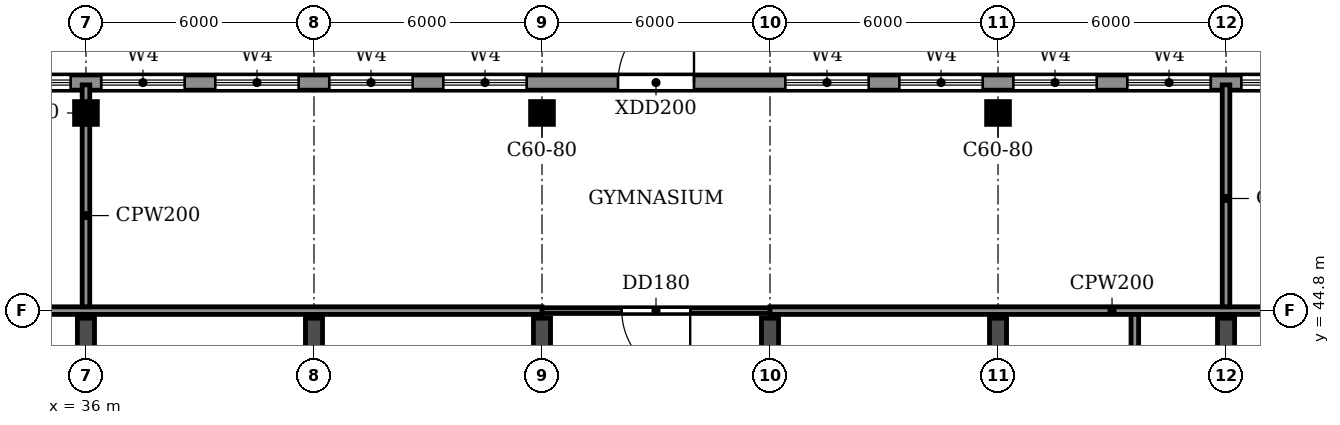
"""IFC4 building model, lengths in metres.
Left out: names, types, materials, properties, quantities, classifications, styles, units other than length and angle.
Written with IfcOpenShell. Run it as: python <this file> out.ifc"""

import sys

from ifc_helpers import new_model, si_unit, direction, frame, frame_2d, origin, origin_2d, place, context, subcontext, project, spatial, rectangle, extrude, source, transform, mapped, element, fill, save


model = new_model("IFC4")
c1 = context("Model", 3, precision=1e-05, world=origin(), true_north=direction((0.0, 1.0)))
c2 = subcontext(c1, "Body", "Model", "MODEL_VIEW")
j1 = project(units=[si_unit("LENGTHUNIT", "METRE"), si_unit("PLANEANGLEUNIT", "RADIAN")], contexts=[c1])
p1 = place(None, origin())
s1 = spatial("IfcSite", under=j1, at=p1, CompositionType="ELEMENT")
p2 = place(p1, origin())
s2 = spatial("IfcBuilding", under=s1, at=p2, CompositionType="ELEMENT")
p3 = place(p2, frame((0.0, 0.0, 19.2)))
s3 = spatial("IfcBuildingStorey", under=s2, at=p3, CompositionType="ELEMENT", Elevation=19.2)
for number, where, z_axis, x_axis in (
    (1, (36.0, 30.55, 0.0), (0.0, 0.0, 1.0), (0.0, 1.0, 0.0)),
    (2, (42.0, 30.55, 0.0), (0.0, 0.0, 1.0), (0.0, 1.0, 0.0)),
    (3, (48.0, 30.55, 0.0), (0.0, 0.0, 1.0), (0.0, 1.0, 0.0)),
    (4, (54.0, 30.55, 0.0), (0.0, 0.0, 1.0), (0.0, 1.0, 0.0)),
    (5, (60.0, 30.55, 0.0), (0.0, 0.0, 1.0), (0.0, 1.0, 0.0)),
    (6, (66.0, 30.55, 0.0), (0.0, 0.0, 1.0), (0.0, 1.0, 0.0)),
):
    element("IfcWall", number, at=place(p3, frame(where, z_axis=z_axis, x_axis=x_axis)), inside=s3, PredefinedType="SHEAR", context=c2, shape_type="SweptSolid", body=[
        extrude(rectangle(XDim=14.05, YDim=0.45, at=frame_2d((7.025, 0.0))), origin(), (0.0, 0.0, 1.0), 3.95),
    ])
m1 = source(origin(), c2, "Body", "SweptSolid", [
    extrude(rectangle(XDim=0.6, YDim=0.6, at=origin_2d()), origin(), (0.0, 0.0, 1.0), 3.95),
])
for number, where, z_axis, x_axis in (
    (7, (36.0, 50.0, 0.0), (0.0, 0.0, 1.0), (1.0, 0.0, 0.0)),
    (8, (48.0, 50.0, 0.0), (0.0, 0.0, 1.0), (1.0, 0.0, 0.0)),
    (9, (60.0, 50.0, 0.0), (0.0, 0.0, 1.0), (1.0, 0.0, 0.0)),
):
    element("IfcColumn", number, at=place(p3, frame(where, z_axis=z_axis, x_axis=x_axis)), inside=s3, PredefinedType="COLUMN", context=c2, shape_type="MappedRepresentation", body=[
        mapped(m1, transform((0.0, 0.0, 0.0))),
    ])
p4 = place(p3, frame((105.0, 50.8, 0.0), z_axis=(0.0, 0.0, 1.0), x_axis=(-1.0, 0.0, 0.0)))
e10 = element("IfcWall", 10, at=p4, inside=s3, PredefinedType="STANDARD", context=c2, shape_type="SweptSolid", body=[
    extrude(rectangle(XDim=108.0, YDim=0.4, at=frame_2d((54.0, 0.0))), origin(), (0.0, 0.0, 1.0), 3.95),
])
p5 = place(p4, frame((102.4, 0.0, 0.9)))
e11 = element("IfcOpeningElement", 11, at=p5, cuts=e10, PredefinedType="OPENING", context=c2, shape_type="SweptSolid", body=[
    extrude(rectangle(XDim=2.2, YDim=2.7, at=frame_2d((1.1, 1.35))), frame((0.0, 0.21, 0.0), z_axis=(0.0, -1.0, 0.0), x_axis=(1.0, 0.0, 0.0)), (0.0, 0.0, 1.0), 0.42),
])
p6 = place(p4, frame((99.4, 0.0, 0.9)))
e12 = element("IfcOpeningElement", 12, at=p6, cuts=e10, PredefinedType="OPENING", context=c2, shape_type="SweptSolid", body=[
    extrude(rectangle(XDim=2.2, YDim=2.7, at=frame_2d((1.1, 1.35))), frame((0.0, 0.21, 0.0), z_axis=(0.0, -1.0, 0.0), x_axis=(1.0, 0.0, 0.0)), (0.0, 0.0, 1.0), 0.42),
])
p7 = place(p4, frame((96.4, 0.0, 0.9)))
e13 = element("IfcOpeningElement", 13, at=p7, cuts=e10, PredefinedType="OPENING", context=c2, shape_type="SweptSolid", body=[
    extrude(rectangle(XDim=2.2, YDim=2.7, at=frame_2d((1.1, 1.35))), frame((0.0, 0.21, 0.0), z_axis=(0.0, -1.0, 0.0), x_axis=(1.0, 0.0, 0.0)), (0.0, 0.0, 1.0), 0.42),
])
p8 = place(p4, frame((93.4, 0.0, 0.9)))
e14 = element("IfcOpeningElement", 14, at=p8, cuts=e10, PredefinedType="OPENING", context=c2, shape_type="SweptSolid", body=[
    extrude(rectangle(XDim=2.2, YDim=2.7, at=frame_2d((1.1, 1.35))), frame((0.0, 0.21, 0.0), z_axis=(0.0, -1.0, 0.0), x_axis=(1.0, 0.0, 0.0)), (0.0, 0.0, 1.0), 0.42),
])
p9 = place(p4, frame((90.4, 0.0, 0.9)))
e15 = element("IfcOpeningElement", 15, at=p9, cuts=e10, PredefinedType="OPENING", context=c2, shape_type="SweptSolid", body=[
    extrude(rectangle(XDim=2.2, YDim=2.7, at=frame_2d((1.1, 1.35))), frame((0.0, 0.21, 0.0), z_axis=(0.0, -1.0, 0.0), x_axis=(1.0, 0.0, 0.0)), (0.0, 0.0, 1.0), 0.42),
])
p10 = place(p4, frame((81.4, 0.0, 0.9)))
e16 = element("IfcOpeningElement", 16, at=p10, cuts=e10, PredefinedType="OPENING", context=c2, shape_type="SweptSolid", body=[
    extrude(rectangle(XDim=2.2, YDim=2.7, at=frame_2d((1.1, 1.35))), frame((0.0, 0.21, 0.0), z_axis=(0.0, -1.0, 0.0), x_axis=(1.0, 0.0, 0.0)), (0.0, 0.0, 1.0), 0.42),
])
p11 = place(p4, frame((78.4, 0.0, 0.9)))
e17 = element("IfcOpeningElement", 17, at=p11, cuts=e10, PredefinedType="OPENING", context=c2, shape_type="SweptSolid", body=[
    extrude(rectangle(XDim=2.2, YDim=2.7, at=frame_2d((1.1, 1.35))), frame((0.0, 0.21, 0.0), z_axis=(0.0, -1.0, 0.0), x_axis=(1.0, 0.0, 0.0)), (0.0, 0.0, 1.0), 0.42),
])
p12 = place(p4, frame((75.4, 0.0, 0.9)))
e18 = element("IfcOpeningElement", 18, at=p12, cuts=e10, PredefinedType="OPENING", context=c2, shape_type="SweptSolid", body=[
    extrude(rectangle(XDim=2.2, YDim=2.7, at=frame_2d((1.1, 1.35))), frame((0.0, 0.21, 0.0), z_axis=(0.0, -1.0, 0.0), x_axis=(1.0, 0.0, 0.0)), (0.0, 0.0, 1.0), 0.42),
])
p13 = place(p4, frame((72.4, 0.0, 0.9)))
e19 = element("IfcOpeningElement", 19, at=p13, cuts=e10, PredefinedType="OPENING", context=c2, shape_type="SweptSolid", body=[
    extrude(rectangle(XDim=2.2, YDim=2.7, at=frame_2d((1.1, 1.35))), frame((0.0, 0.21, 0.0), z_axis=(0.0, -1.0, 0.0), x_axis=(1.0, 0.0, 0.0)), (0.0, 0.0, 1.0), 0.42),
])
p14 = place(p4, frame((69.4, 0.0, 0.9)))
e20 = element("IfcOpeningElement", 20, at=p14, cuts=e10, PredefinedType="OPENING", context=c2, shape_type="SweptSolid", body=[
    extrude(rectangle(XDim=2.2, YDim=2.7, at=frame_2d((1.1, 1.35))), frame((0.0, 0.21, 0.0), z_axis=(0.0, -1.0, 0.0), x_axis=(1.0, 0.0, 0.0)), (0.0, 0.0, 1.0), 0.42),
])
p15 = place(p4, frame((66.4, 0.0, 0.9)))
e21 = element("IfcOpeningElement", 21, at=p15, cuts=e10, PredefinedType="OPENING", context=c2, shape_type="SweptSolid", body=[
    extrude(rectangle(XDim=2.2, YDim=2.7, at=frame_2d((1.1, 1.35))), frame((0.0, 0.21, 0.0), z_axis=(0.0, -1.0, 0.0), x_axis=(1.0, 0.0, 0.0)), (0.0, 0.0, 1.0), 0.42),
])
p16 = place(p4, frame((63.4, 0.0, 0.9)))
e22 = element("IfcOpeningElement", 22, at=p16, cuts=e10, PredefinedType="OPENING", context=c2, shape_type="SweptSolid", body=[
    extrude(rectangle(XDim=2.2, YDim=2.7, at=frame_2d((1.1, 1.35))), frame((0.0, 0.21, 0.0), z_axis=(0.0, -1.0, 0.0), x_axis=(1.0, 0.0, 0.0)), (0.0, 0.0, 1.0), 0.42),
])
p17 = place(p4, frame((60.4, 0.0, 0.9)))
e23 = element("IfcOpeningElement", 23, at=p17, cuts=e10, PredefinedType="OPENING", context=c2, shape_type="SweptSolid", body=[
    extrude(rectangle(XDim=2.2, YDim=2.7, at=frame_2d((1.1, 1.35))), frame((0.0, 0.21, 0.0), z_axis=(0.0, -1.0, 0.0), x_axis=(1.0, 0.0, 0.0)), (0.0, 0.0, 1.0), 0.42),
])
p18 = place(p4, frame((57.4, 0.0, 0.9)))
e24 = element("IfcOpeningElement", 24, at=p18, cuts=e10, PredefinedType="OPENING", context=c2, shape_type="SweptSolid", body=[
    extrude(rectangle(XDim=2.2, YDim=2.7, at=frame_2d((1.1, 1.35))), frame((0.0, 0.21, 0.0), z_axis=(0.0, -1.0, 0.0), x_axis=(1.0, 0.0, 0.0)), (0.0, 0.0, 1.0), 0.42),
])
p19 = place(p4, frame((48.4, 0.0, 0.9)))
e25 = element("IfcOpeningElement", 25, at=p19, cuts=e10, PredefinedType="OPENING", context=c2, shape_type="SweptSolid", body=[
    extrude(rectangle(XDim=2.2, YDim=2.7, at=frame_2d((1.1, 1.35))), frame((0.0, 0.21, 0.0), z_axis=(0.0, -1.0, 0.0), x_axis=(1.0, 0.0, 0.0)), (0.0, 0.0, 1.0), 0.42),
])
p20 = place(p4, frame((45.4, 0.0, 0.9)))
e26 = element("IfcOpeningElement", 26, at=p20, cuts=e10, PredefinedType="OPENING", context=c2, shape_type="SweptSolid", body=[
    extrude(rectangle(XDim=2.2, YDim=2.7, at=frame_2d((1.1, 1.35))), frame((0.0, 0.21, 0.0), z_axis=(0.0, -1.0, 0.0), x_axis=(1.0, 0.0, 0.0)), (0.0, 0.0, 1.0), 0.42),
])
p21 = place(p4, frame((42.4, 0.0, 0.9)))
e27 = element("IfcOpeningElement", 27, at=p21, cuts=e10, PredefinedType="OPENING", context=c2, shape_type="SweptSolid", body=[
    extrude(rectangle(XDim=2.2, YDim=2.7, at=frame_2d((1.1, 1.35))), frame((0.0, 0.21, 0.0), z_axis=(0.0, -1.0, 0.0), x_axis=(1.0, 0.0, 0.0)), (0.0, 0.0, 1.0), 0.42),
])
p22 = place(p4, frame((39.4, 0.0, 0.9)))
e28 = element("IfcOpeningElement", 28, at=p22, cuts=e10, PredefinedType="OPENING", context=c2, shape_type="SweptSolid", body=[
    extrude(rectangle(XDim=2.2, YDim=2.7, at=frame_2d((1.1, 1.35))), frame((0.0, 0.21, 0.0), z_axis=(0.0, -1.0, 0.0), x_axis=(1.0, 0.0, 0.0)), (0.0, 0.0, 1.0), 0.42),
])
p23 = place(p4, frame((36.4, 0.0, 0.9)))
e29 = element("IfcOpeningElement", 29, at=p23, cuts=e10, PredefinedType="OPENING", context=c2, shape_type="SweptSolid", body=[
    extrude(rectangle(XDim=2.2, YDim=2.7, at=frame_2d((1.1, 1.35))), frame((0.0, 0.21, 0.0), z_axis=(0.0, -1.0, 0.0), x_axis=(1.0, 0.0, 0.0)), (0.0, 0.0, 1.0), 0.42),
])
p24 = place(p4, frame((33.4, 0.0, 0.9)))
e30 = element("IfcOpeningElement", 30, at=p24, cuts=e10, PredefinedType="OPENING", context=c2, shape_type="SweptSolid", body=[
    extrude(rectangle(XDim=2.2, YDim=2.7, at=frame_2d((1.1, 1.35))), frame((0.0, 0.21, 0.0), z_axis=(0.0, -1.0, 0.0), x_axis=(1.0, 0.0, 0.0)), (0.0, 0.0, 1.0), 0.42),
])
p25 = place(p4, frame((24.4, 0.0, 0.9)))
e31 = element("IfcOpeningElement", 31, at=p25, cuts=e10, PredefinedType="OPENING", context=c2, shape_type="SweptSolid", body=[
    extrude(rectangle(XDim=2.2, YDim=2.7, at=frame_2d((1.1, 1.35))), frame((0.0, 0.21, 0.0), z_axis=(0.0, -1.0, 0.0), x_axis=(1.0, 0.0, 0.0)), (0.0, 0.0, 1.0), 0.42),
])
p26 = place(p4, frame((21.4, 0.0, 0.9)))
e32 = element("IfcOpeningElement", 32, at=p26, cuts=e10, PredefinedType="OPENING", context=c2, shape_type="SweptSolid", body=[
    extrude(rectangle(XDim=2.2, YDim=2.7, at=frame_2d((1.1, 1.35))), frame((0.0, 0.21, 0.0), z_axis=(0.0, -1.0, 0.0), x_axis=(1.0, 0.0, 0.0)), (0.0, 0.0, 1.0), 0.42),
])
p27 = place(p4, frame((18.4, 0.0, 0.9)))
e33 = element("IfcOpeningElement", 33, at=p27, cuts=e10, PredefinedType="OPENING", context=c2, shape_type="SweptSolid", body=[
    extrude(rectangle(XDim=2.2, YDim=2.7, at=frame_2d((1.1, 1.35))), frame((0.0, 0.21, 0.0), z_axis=(0.0, -1.0, 0.0), x_axis=(1.0, 0.0, 0.0)), (0.0, 0.0, 1.0), 0.42),
])
p28 = place(p4, frame((15.4, 0.0, 0.9)))
e34 = element("IfcOpeningElement", 34, at=p28, cuts=e10, PredefinedType="OPENING", context=c2, shape_type="SweptSolid", body=[
    extrude(rectangle(XDim=2.2, YDim=2.7, at=frame_2d((1.1, 1.35))), frame((0.0, 0.21, 0.0), z_axis=(0.0, -1.0, 0.0), x_axis=(1.0, 0.0, 0.0)), (0.0, 0.0, 1.0), 0.42),
])
p29 = place(p4, frame((12.4, 0.0, 0.9)))
e35 = element("IfcOpeningElement", 35, at=p29, cuts=e10, PredefinedType="OPENING", context=c2, shape_type="SweptSolid", body=[
    extrude(rectangle(XDim=2.2, YDim=2.7, at=frame_2d((1.1, 1.35))), frame((0.0, 0.21, 0.0), z_axis=(0.0, -1.0, 0.0), x_axis=(1.0, 0.0, 0.0)), (0.0, 0.0, 1.0), 0.42),
])
p30 = place(p4, frame((9.4, 0.0, 0.9)))
e36 = element("IfcOpeningElement", 36, at=p30, cuts=e10, PredefinedType="OPENING", context=c2, shape_type="SweptSolid", body=[
    extrude(rectangle(XDim=2.2, YDim=2.7, at=frame_2d((1.1, 1.35))), frame((0.0, 0.21, 0.0), z_axis=(0.0, -1.0, 0.0), x_axis=(1.0, 0.0, 0.0)), (0.0, 0.0, 1.0), 0.42),
])
p31 = place(p4, frame((6.4, 0.0, 0.9)))
e37 = element("IfcOpeningElement", 37, at=p31, cuts=e10, PredefinedType="OPENING", context=c2, shape_type="SweptSolid", body=[
    extrude(rectangle(XDim=2.2, YDim=2.7, at=frame_2d((1.1, 1.35))), frame((0.0, 0.21, 0.0), z_axis=(0.0, -1.0, 0.0), x_axis=(1.0, 0.0, 0.0)), (0.0, 0.0, 1.0), 0.42),
])
p32 = place(p4, frame((3.4, 0.0, 0.9)))
e38 = element("IfcOpeningElement", 38, at=p32, cuts=e10, PredefinedType="OPENING", context=c2, shape_type="SweptSolid", body=[
    extrude(rectangle(XDim=2.2, YDim=2.7, at=frame_2d((1.1, 1.35))), frame((0.0, 0.21, 0.0), z_axis=(0.0, -1.0, 0.0), x_axis=(1.0, 0.0, 0.0)), (0.0, 0.0, 1.0), 0.42),
])
p33 = place(p4, frame((86.0, 0.0, 0.0)))
e39 = element("IfcOpeningElement", 39, at=p33, cuts=e10, PredefinedType="OPENING", context=c2, shape_type="SweptSolid", body=[
    extrude(rectangle(XDim=2.0, YDim=2.4, at=frame_2d((1.0, 1.2))), frame((0.0, 0.21, 0.0), z_axis=(0.0, -1.0, 0.0), x_axis=(1.0, 0.0, 0.0)), (0.0, 0.0, 1.0), 0.42),
])
p34 = place(p4, frame((53.0, 0.0, 0.0)))
e40 = element("IfcOpeningElement", 40, at=p34, cuts=e10, PredefinedType="OPENING", context=c2, shape_type="SweptSolid", body=[
    extrude(rectangle(XDim=2.0, YDim=2.4, at=frame_2d((1.0, 1.2))), frame((0.0, 0.21, 0.0), z_axis=(0.0, -1.0, 0.0), x_axis=(1.0, 0.0, 0.0)), (0.0, 0.0, 1.0), 0.42),
])
p35 = place(p4, frame((29.0, 0.0, 0.0)))
e41 = element("IfcOpeningElement", 41, at=p35, cuts=e10, PredefinedType="OPENING", context=c2, shape_type="SweptSolid", body=[
    extrude(rectangle(XDim=2.0, YDim=2.4, at=frame_2d((1.0, 1.2))), frame((0.0, 0.21, 0.0), z_axis=(0.0, -1.0, 0.0), x_axis=(1.0, 0.0, 0.0)), (0.0, 0.0, 1.0), 0.42),
])
p36 = place(p3, frame((48.0, 44.8, 0.0), z_axis=(0.0, 0.0, 1.0), x_axis=(1.0, 0.0, 0.0)))
e42 = element("IfcWall", 42, at=p36, inside=s3, PredefinedType="PARTITIONING", context=c2, shape_type="SweptSolid", body=[
    extrude(rectangle(XDim=6.0, YDim=0.15, at=frame_2d((3.0, 0.0))), origin(), (0.0, 0.0, 1.0), 3.95),
])
p37 = place(p36, frame((2.1, 0.0, 0.0)))
e43 = element("IfcOpeningElement", 43, at=p37, cuts=e42, PredefinedType="OPENING", context=c2, shape_type="SweptSolid", body=[
    extrude(rectangle(XDim=1.8, YDim=2.1, at=frame_2d((0.9, 1.05))), frame((0.0, 0.085, 0.0), z_axis=(0.0, -1.0, 0.0), x_axis=(1.0, 0.0, 0.0)), (0.0, 0.0, 1.0), 0.17),
])
p38 = place(p3, frame((18.0, 44.8, 0.0), z_axis=(0.0, 0.0, 1.0), x_axis=(1.0, 0.0, 0.0)))
e44 = element("IfcWall", 44, at=p38, inside=s3, PredefinedType="PARTITIONING", context=c2, shape_type="SweptSolid", body=[
    extrude(rectangle(XDim=30.0, YDim=0.2, at=frame_2d((15.0, 0.0))), origin(), (0.0, 0.0, 1.0), 3.95),
])
p39 = place(p3, frame((54.0, 44.8, 0.0), z_axis=(0.0, 0.0, 1.0), x_axis=(1.0, 0.0, 0.0)))
e45 = element("IfcWall", 45, at=p39, inside=s3, PredefinedType="PARTITIONING", context=c2, shape_type="SweptSolid", body=[
    extrude(rectangle(XDim=18.0, YDim=0.2, at=frame_2d((9.0, 0.0))), origin(), (0.0, 0.0, 1.0), 3.95),
])
p40 = place(p3, frame((36.0, 44.9, 0.0), z_axis=(0.0, 0.0, 1.0), x_axis=(0.0, 1.0, 0.0)))
e46 = element("IfcWall", 46, at=p40, inside=s3, PredefinedType="PARTITIONING", context=c2, shape_type="SweptSolid", body=[
    extrude(rectangle(XDim=5.84, YDim=0.2, at=frame_2d((2.92, 0.0))), origin(), (0.0, 0.0, 1.0), 3.95),
])
p41 = place(p3, frame((63.6, 32.875, 0.0), z_axis=(0.0, 0.0, 1.0), x_axis=(0.0, 1.0, 0.0)))
e47 = element("IfcWall", 47, at=p41, inside=s3, PredefinedType="PARTITIONING", context=c2, shape_type="SweptSolid", body=[
    extrude(rectangle(XDim=11.825, YDim=0.2, at=frame_2d((5.913, 0.0))), origin(), (0.0, 0.0, 1.0), 3.95),
])
p42 = place(p3, frame((66.0, 44.9, 0.0), z_axis=(0.0, 0.0, 1.0), x_axis=(0.0, 1.0, 0.0)))
e48 = element("IfcWall", 48, at=p42, inside=s3, PredefinedType="PARTITIONING", context=c2, shape_type="SweptSolid", body=[
    extrude(rectangle(XDim=5.84, YDim=0.2, at=frame_2d((2.92, 0.0))), origin(), (0.0, 0.0, 1.0), 3.95),
])
p43 = place(p14, origin())
e49 = element("IfcWindow", 49, at=p43, inside=s3, PartitioningType="DOUBLE_PANEL_HORIZONTAL", PredefinedType="WINDOW", context=c2, shape_type="SweptSolid", body=[
    extrude(rectangle(XDim=2.2, YDim=2.7, at=frame_2d((1.1, 1.35))), frame((0.0, 0.03, 0.0), z_axis=(0.0, -1.0, 0.0), x_axis=(1.0, 0.0, 0.0)), (0.0, 0.0, 1.0), 0.06),
])
fill(e20, e49)
p44 = place(p15, origin())
e50 = element("IfcWindow", 50, at=p44, inside=s3, PartitioningType="DOUBLE_PANEL_HORIZONTAL", PredefinedType="WINDOW", context=c2, shape_type="SweptSolid", body=[
    extrude(rectangle(XDim=2.2, YDim=2.7, at=frame_2d((1.1, 1.35))), frame((0.0, 0.03, 0.0), z_axis=(0.0, -1.0, 0.0), x_axis=(1.0, 0.0, 0.0)), (0.0, 0.0, 1.0), 0.06),
])
fill(e21, e50)
p45 = place(p16, origin())
e51 = element("IfcWindow", 51, at=p45, inside=s3, PartitioningType="DOUBLE_PANEL_HORIZONTAL", PredefinedType="WINDOW", context=c2, shape_type="SweptSolid", body=[
    extrude(rectangle(XDim=2.2, YDim=2.7, at=frame_2d((1.1, 1.35))), frame((0.0, 0.03, 0.0), z_axis=(0.0, -1.0, 0.0), x_axis=(1.0, 0.0, 0.0)), (0.0, 0.0, 1.0), 0.06),
])
fill(e22, e51)
p46 = place(p17, origin())
e52 = element("IfcWindow", 52, at=p46, inside=s3, PartitioningType="DOUBLE_PANEL_HORIZONTAL", PredefinedType="WINDOW", context=c2, shape_type="SweptSolid", body=[
    extrude(rectangle(XDim=2.2, YDim=2.7, at=frame_2d((1.1, 1.35))), frame((0.0, 0.03, 0.0), z_axis=(0.0, -1.0, 0.0), x_axis=(1.0, 0.0, 0.0)), (0.0, 0.0, 1.0), 0.06),
])
fill(e23, e52)
p47 = place(p18, origin())
e53 = element("IfcWindow", 53, at=p47, inside=s3, PartitioningType="DOUBLE_PANEL_HORIZONTAL", PredefinedType="WINDOW", context=c2, shape_type="SweptSolid", body=[
    extrude(rectangle(XDim=2.2, YDim=2.7, at=frame_2d((1.1, 1.35))), frame((0.0, 0.03, 0.0), z_axis=(0.0, -1.0, 0.0), x_axis=(1.0, 0.0, 0.0)), (0.0, 0.0, 1.0), 0.06),
])
fill(e24, e53)
p48 = place(p19, origin())
e54 = element("IfcWindow", 54, at=p48, inside=s3, PartitioningType="DOUBLE_PANEL_HORIZONTAL", PredefinedType="WINDOW", context=c2, shape_type="SweptSolid", body=[
    extrude(rectangle(XDim=2.2, YDim=2.7, at=frame_2d((1.1, 1.35))), frame((0.0, 0.03, 0.0), z_axis=(0.0, -1.0, 0.0), x_axis=(1.0, 0.0, 0.0)), (0.0, 0.0, 1.0), 0.06),
])
fill(e25, e54)
p49 = place(p20, origin())
e55 = element("IfcWindow", 55, at=p49, inside=s3, PartitioningType="DOUBLE_PANEL_HORIZONTAL", PredefinedType="WINDOW", context=c2, shape_type="SweptSolid", body=[
    extrude(rectangle(XDim=2.2, YDim=2.7, at=frame_2d((1.1, 1.35))), frame((0.0, 0.03, 0.0), z_axis=(0.0, -1.0, 0.0), x_axis=(1.0, 0.0, 0.0)), (0.0, 0.0, 1.0), 0.06),
])
fill(e26, e55)
p50 = place(p21, origin())
e56 = element("IfcWindow", 56, at=p50, inside=s3, PartitioningType="DOUBLE_PANEL_HORIZONTAL", PredefinedType="WINDOW", context=c2, shape_type="SweptSolid", body=[
    extrude(rectangle(XDim=2.2, YDim=2.7, at=frame_2d((1.1, 1.35))), frame((0.0, 0.03, 0.0), z_axis=(0.0, -1.0, 0.0), x_axis=(1.0, 0.0, 0.0)), (0.0, 0.0, 1.0), 0.06),
])
fill(e27, e56)
p51 = place(p22, origin())
e57 = element("IfcWindow", 57, at=p51, inside=s3, PartitioningType="DOUBLE_PANEL_HORIZONTAL", PredefinedType="WINDOW", context=c2, shape_type="SweptSolid", body=[
    extrude(rectangle(XDim=2.2, YDim=2.7, at=frame_2d((1.1, 1.35))), frame((0.0, 0.03, 0.0), z_axis=(0.0, -1.0, 0.0), x_axis=(1.0, 0.0, 0.0)), (0.0, 0.0, 1.0), 0.06),
])
fill(e28, e57)
p52 = place(p23, origin())
e58 = element("IfcWindow", 58, at=p52, inside=s3, PartitioningType="DOUBLE_PANEL_HORIZONTAL", PredefinedType="WINDOW", context=c2, shape_type="SweptSolid", body=[
    extrude(rectangle(XDim=2.2, YDim=2.7, at=frame_2d((1.1, 1.35))), frame((0.0, 0.03, 0.0), z_axis=(0.0, -1.0, 0.0), x_axis=(1.0, 0.0, 0.0)), (0.0, 0.0, 1.0), 0.06),
])
fill(e29, e58)
p53 = place(p37, frame((1.8, 0.0, 0.0), z_axis=(0.0, 0.0, 1.0), x_axis=(-1.0, 0.0, 0.0)))
e59 = element("IfcDoor", 59, at=p53, inside=s3, OperationType="DOUBLE_DOOR_SINGLE_SWING", PredefinedType="DOOR", context=c2, shape_type="SweptSolid", body=[
    extrude(rectangle(XDim=1.8, YDim=2.1, at=frame_2d((0.9, 1.05))), frame((0.0, 0.025, 0.0), z_axis=(0.0, -1.0, 0.0), x_axis=(1.0, 0.0, 0.0)), (0.0, 0.0, 1.0), 0.05),
])
fill(e43, e59)
p54 = place(p34, frame((2.0, 0.0, 0.0), z_axis=(0.0, 0.0, 1.0), x_axis=(-1.0, 0.0, 0.0)))
e60 = element("IfcDoor", 60, at=p54, inside=s3, OperationType="DOUBLE_DOOR_SINGLE_SWING", PredefinedType="DOOR", context=c2, shape_type="SweptSolid", body=[
    extrude(rectangle(XDim=2.0, YDim=2.4, at=frame_2d((1.0, 1.2))), frame((0.0, 0.025, 0.0), z_axis=(0.0, -1.0, 0.0), x_axis=(1.0, 0.0, 0.0)), (0.0, 0.0, 1.0), 0.05),
])
fill(e40, e60)
save(model, sys.argv[1])
